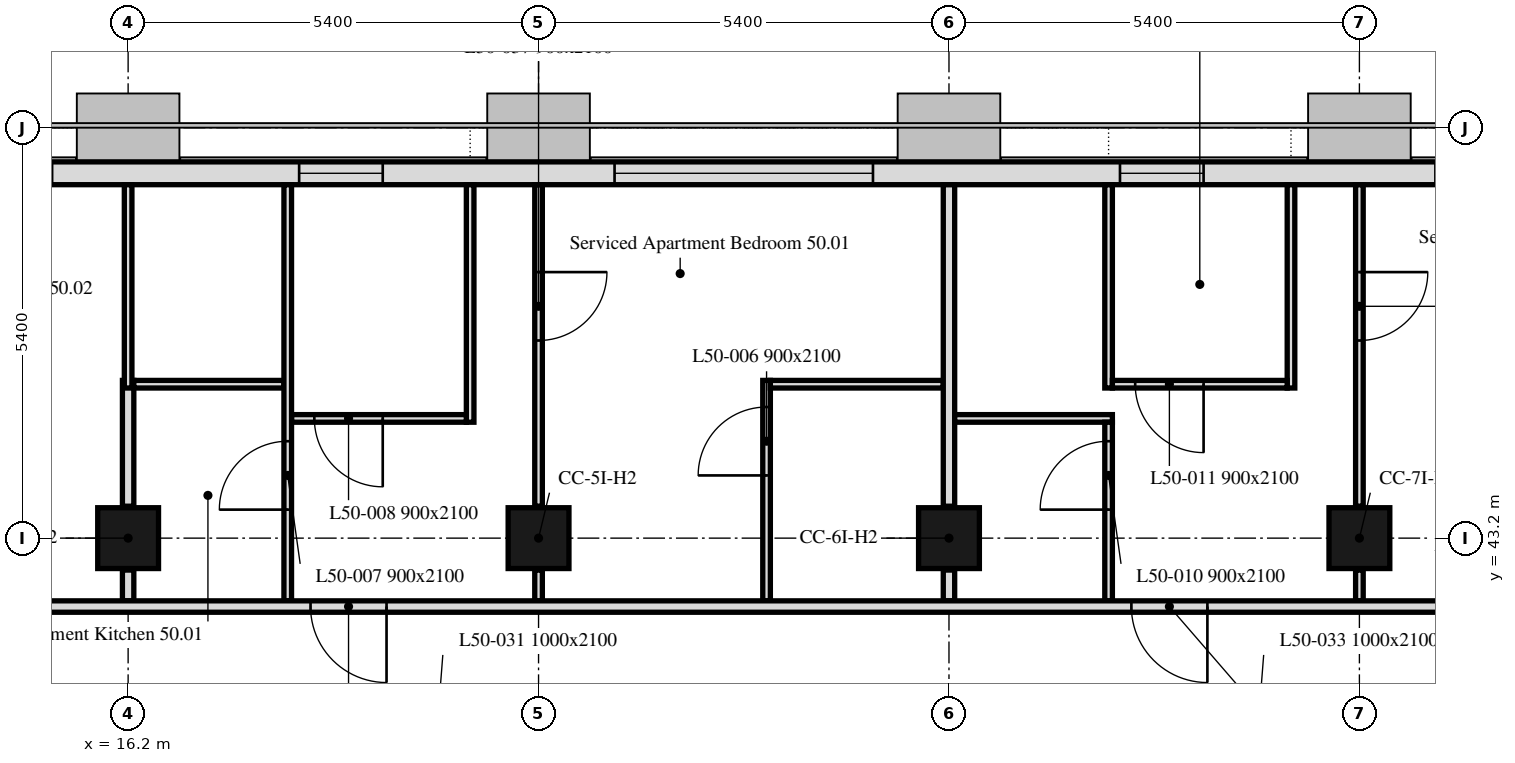
"""IFC4 building model, lengths in metres.
Left out: names, types, materials, properties, quantities, classifications, styles, units other than length and angle.
Written with IfcOpenShell. Run it as: python <this file> out.ifc"""

import sys

from ifc_helpers import new_model, si_unit, direction, frame, frame_2d, origin, origin_2d, place, context, subcontext, project, spatial, rectangle, extrude, element, fill, save


model = new_model("IFC4")
c1 = context("Model", 3, precision=1e-05, world=origin(), true_north=direction((0.0, 1.0)))
c2 = subcontext(c1, "Body", "Model", "MODEL_VIEW")
j1 = project(units=[si_unit("LENGTHUNIT", "METRE"), si_unit("PLANEANGLEUNIT", "RADIAN")], contexts=[c1])
p1 = place(None, origin())
s1 = spatial("IfcSite", under=j1, at=p1, CompositionType="ELEMENT")
p2 = place(p1, origin())
s2 = spatial("IfcBuilding", under=s1, at=p2, CompositionType="ELEMENT")
p3 = place(p2, frame((0.0, 0.0, 203.8)))
s3 = spatial("IfcBuildingStorey", under=s2, at=p3, CompositionType="ELEMENT", Elevation=203.8)
for number, where, z_axis, x_axis in (
    (1, (16.2, 43.2, 0.0), (0.0, 0.0, 1.0), (1.0, 0.0, 0.0)),
    (2, (21.6, 43.2, 0.0), (0.0, 0.0, 1.0), (1.0, 0.0, 0.0)),
    (3, (27.0, 43.2, 0.0), (0.0, 0.0, 1.0), (1.0, 0.0, 0.0)),
    (4, (32.4, 43.2, 0.0), (0.0, 0.0, 1.0), (1.0, 0.0, 0.0)),
):
    element("IfcColumn", number, at=place(p3, frame(where, z_axis=z_axis, x_axis=x_axis)), inside=s3, PredefinedType="COLUMN", context=c2, shape_type="SweptSolid", body=[
        extrude(rectangle(XDim=0.8, YDim=0.8, at=origin_2d()), origin(), (0.0, 0.0, 1.0), 3.0),
    ])
p4 = place(p3, frame((43.014, 48.0, 0.0), z_axis=(0.0, 0.0, 1.0), x_axis=(-1.0, 0.0, 0.0)))
e5 = element("IfcWall", 5, at=p4, inside=s3, PredefinedType="SOLIDWALL", context=c2, shape_type="SweptSolid", body=[
    extrude(rectangle(XDim=32.027, YDim=0.3, at=frame_2d((16.014, 0.0))), origin(), (0.0, 0.0, 1.0), 3.0),
])
p5 = place(p4, frame((2.764, 0.0, 0.9)))
e6 = element("IfcOpeningElement", 6, at=p5, cuts=e5, PredefinedType="OPENING", context=c2, shape_type="SweptSolid", body=[
    extrude(rectangle(XDim=1.1, YDim=1.7, at=frame_2d((0.55, 0.85))), frame((0.0, 0.16, 0.0), z_axis=(0.0, -1.0, 0.0), x_axis=(1.0, 0.0, 0.0)), (0.0, 0.0, 1.0), 0.32),
])
p6 = place(p4, frame((6.214, 0.0, 0.9)))
e7 = element("IfcOpeningElement", 7, at=p6, cuts=e5, PredefinedType="OPENING", context=c2, shape_type="SweptSolid", body=[
    extrude(rectangle(XDim=3.4, YDim=1.7, at=frame_2d((1.7, 0.85))), frame((0.0, 0.16, 0.0), z_axis=(0.0, -1.0, 0.0), x_axis=(1.0, 0.0, 0.0)), (0.0, 0.0, 1.0), 0.32),
])
p7 = place(p4, frame((12.664, 0.0, 0.9)))
e8 = element("IfcOpeningElement", 8, at=p7, cuts=e5, PredefinedType="OPENING", context=c2, shape_type="SweptSolid", body=[
    extrude(rectangle(XDim=1.1, YDim=1.7, at=frame_2d((0.55, 0.85))), frame((0.0, 0.16, 0.0), z_axis=(0.0, -1.0, 0.0), x_axis=(1.0, 0.0, 0.0)), (0.0, 0.0, 1.0), 0.32),
])
p8 = place(p4, frame((17.014, 0.0, 0.9)))
e9 = element("IfcOpeningElement", 9, at=p8, cuts=e5, PredefinedType="OPENING", context=c2, shape_type="SweptSolid", body=[
    extrude(rectangle(XDim=3.4, YDim=1.7, at=frame_2d((1.7, 0.85))), frame((0.0, 0.16, 0.0), z_axis=(0.0, -1.0, 0.0), x_axis=(1.0, 0.0, 0.0)), (0.0, 0.0, 1.0), 0.32),
])
p9 = place(p4, frame((23.464, 0.0, 0.9)))
e10 = element("IfcOpeningElement", 10, at=p9, cuts=e5, PredefinedType="OPENING", context=c2, shape_type="SweptSolid", body=[
    extrude(rectangle(XDim=1.1, YDim=1.7, at=frame_2d((0.55, 0.85))), frame((0.0, 0.16, 0.0), z_axis=(0.0, -1.0, 0.0), x_axis=(1.0, 0.0, 0.0)), (0.0, 0.0, 1.0), 0.32),
])
p10 = place(p4, frame((27.814, 0.0, 0.9)))
e11 = element("IfcOpeningElement", 11, at=p10, cuts=e5, PredefinedType="OPENING", context=c2, shape_type="SweptSolid", body=[
    extrude(rectangle(XDim=3.4, YDim=1.7, at=frame_2d((1.7, 0.85))), frame((0.0, 0.16, 0.0), z_axis=(0.0, -1.0, 0.0), x_axis=(1.0, 0.0, 0.0)), (0.0, 0.0, 1.0), 0.32),
])
p11 = place(p3, frame((16.2, 42.375, 0.0), z_axis=(0.0, 0.0, 1.0), x_axis=(0.0, 1.0, 0.0)))
e12 = element("IfcWall", 12, at=p11, inside=s3, PredefinedType="PARTITIONING", context=c2, shape_type="SweptSolid", body=[
    extrude(rectangle(XDim=0.405, YDim=0.15, at=frame_2d((0.203, 0.0))), origin(), (0.0, 0.0, 1.0), 2.4),
])
p12 = place(p3, frame((16.2, 43.62, 0.0), z_axis=(0.0, 0.0, 1.0), x_axis=(0.0, 1.0, 0.0)))
e13 = element("IfcWall", 13, at=p12, inside=s3, PredefinedType="PARTITIONING", context=c2, shape_type="SweptSolid", body=[
    extrude(rectangle(XDim=1.655, YDim=0.15, at=frame_2d((0.827, 0.0))), origin(), (0.0, 0.0, 1.0), 2.4),
])
p13 = place(p3, frame((16.2, 45.175, 0.0), z_axis=(0.0, 0.0, 1.0), x_axis=(0.0, 1.0, 0.0)))
e14 = element("IfcWall", 14, at=p13, inside=s3, PredefinedType="PARTITIONING", context=c2, shape_type="SweptSolid", body=[
    extrude(rectangle(XDim=2.674, YDim=0.1, at=frame_2d((1.337, 0.0))), origin(), (0.0, 0.0, 1.0), 2.4),
])
p14 = place(p3, frame((21.6, 47.849, 0.0), z_axis=(0.0, 0.0, 1.0), x_axis=(0.0, -1.0, 0.0)))
e15 = element("IfcWall", 15, at=p14, inside=s3, PredefinedType="PARTITIONING", context=c2, shape_type="SweptSolid", body=[
    extrude(rectangle(XDim=4.229, YDim=0.1, at=frame_2d((2.115, 0.0))), origin(), (0.0, 0.0, 1.0), 2.4),
])
p15 = place(p14, frame((1.149, 0.0, 0.0)))
e16 = element("IfcOpeningElement", 16, at=p15, cuts=e15, PredefinedType="OPENING", context=c2, shape_type="SweptSolid", body=[
    extrude(rectangle(XDim=0.9, YDim=2.1, at=frame_2d((0.45, 1.05))), frame((0.0, 0.05, 0.0), z_axis=(0.0, -1.0, 0.0), x_axis=(1.0, 0.0, 0.0)), (0.0, 0.0, 1.0), 0.1),
])
p16 = place(p3, frame((21.6, 42.78, 0.0), z_axis=(0.0, 0.0, 1.0), x_axis=(0.0, -1.0, 0.0)))
e17 = element("IfcWall", 17, at=p16, inside=s3, PredefinedType="PARTITIONING", context=c2, shape_type="SweptSolid", body=[
    extrude(rectangle(XDim=0.405, YDim=0.1, at=frame_2d((0.203, 0.0))), origin(), (0.0, 0.0, 1.0), 2.4),
])
p17 = place(p3, frame((24.6, 42.375, 0.0), z_axis=(0.0, 0.0, 1.0), x_axis=(0.0, 1.0, 0.0)))
e18 = element("IfcWall", 18, at=p17, inside=s3, PredefinedType="PARTITIONING", context=c2, shape_type="SweptSolid", body=[
    extrude(rectangle(XDim=2.9, YDim=0.1, at=frame_2d((1.45, 0.0))), origin(), (0.0, 0.0, 1.0), 3.0),
])
p18 = place(p17, frame((1.65, 0.0, 0.0)))
e19 = element("IfcOpeningElement", 19, at=p18, cuts=e18, PredefinedType="OPENING", context=c2, shape_type="SweptSolid", body=[
    extrude(rectangle(XDim=0.9, YDim=2.1, at=frame_2d((0.45, 1.05))), frame((0.0, 0.05, 0.0), z_axis=(0.0, -1.0, 0.0), x_axis=(1.0, 0.0, 0.0)), (0.0, 0.0, 1.0), 0.1),
])
p19 = place(p3, frame((24.65, 45.225, 0.0), z_axis=(0.0, 0.0, 1.0), x_axis=(1.0, 0.0, 0.0)))
e20 = element("IfcWall", 20, at=p19, inside=s3, PredefinedType="PARTITIONING", context=c2, shape_type="SweptSolid", body=[
    extrude(rectangle(XDim=2.275, YDim=0.1, at=frame_2d((1.138, 0.0))), origin(), (0.0, 0.0, 1.0), 3.0),
])
p20 = place(p3, frame((18.25, 45.225, 0.0), z_axis=(0.0, 0.0, 1.0), x_axis=(-1.0, 0.0, 0.0)))
e21 = element("IfcWall", 21, at=p20, inside=s3, PredefinedType="PARTITIONING", context=c2, shape_type="SweptSolid", body=[
    extrude(rectangle(XDim=1.975, YDim=0.1, at=frame_2d((0.988, 0.0))), origin(), (0.0, 0.0, 1.0), 3.0),
])
p21 = place(p3, frame((20.7, 47.849, 0.0), z_axis=(0.0, 0.0, 1.0), x_axis=(0.0, -1.0, 0.0)))
e22 = element("IfcWall", 22, at=p21, inside=s3, PredefinedType="PARTITIONING", context=c2, shape_type="SweptSolid", body=[
    extrude(rectangle(XDim=3.124, YDim=0.1, at=frame_2d((1.562, 0.0))), origin(), (0.0, 0.0, 1.0), 3.0),
])
p22 = place(p3, frame((20.65, 44.775, 0.0), z_axis=(0.0, 0.0, 1.0), x_axis=(-1.0, 0.0, 0.0)))
e23 = element("IfcWall", 23, at=p22, inside=s3, PredefinedType="PARTITIONING", context=c2, shape_type="SweptSolid", body=[
    extrude(rectangle(XDim=2.3, YDim=0.1, at=frame_2d((1.15, 0.0))), origin(), (0.0, 0.0, 1.0), 3.0),
])
p23 = place(p22, frame((1.1, 0.0, 0.0)))
e24 = element("IfcOpeningElement", 24, at=p23, cuts=e23, PredefinedType="OPENING", context=c2, shape_type="SweptSolid", body=[
    extrude(rectangle(XDim=0.9, YDim=2.1, at=frame_2d((0.45, 1.05))), frame((0.0, 0.05, 0.0), z_axis=(0.0, -1.0, 0.0), x_axis=(1.0, 0.0, 0.0)), (0.0, 0.0, 1.0), 0.1),
])
p24 = place(p3, frame((27.0, 42.375, 0.0), z_axis=(0.0, 0.0, 1.0), x_axis=(0.0, 1.0, 0.0)))
e25 = element("IfcWall", 25, at=p24, inside=s3, PredefinedType="PARTITIONING", context=c2, shape_type="SweptSolid", body=[
    extrude(rectangle(XDim=0.405, YDim=0.15, at=frame_2d((0.203, 0.0))), origin(), (0.0, 0.0, 1.0), 2.4),
])
p25 = place(p3, frame((27.0, 43.62, 0.0), z_axis=(0.0, 0.0, 1.0), x_axis=(0.0, 1.0, 0.0)))
e26 = element("IfcWall", 26, at=p25, inside=s3, PredefinedType="PARTITIONING", context=c2, shape_type="SweptSolid", body=[
    extrude(rectangle(XDim=4.229, YDim=0.15, at=frame_2d((2.115, 0.0))), origin(), (0.0, 0.0, 1.0), 2.4),
])
p26 = place(p3, frame((18.3, 42.375, 0.0), z_axis=(0.0, 0.0, 1.0), x_axis=(0.0, 1.0, 0.0)))
e27 = element("IfcWall", 27, at=p26, inside=s3, PredefinedType="PARTITIONING", context=c2, shape_type="SweptSolid", body=[
    extrude(rectangle(XDim=5.474, YDim=0.1, at=frame_2d((2.737, 0.0))), origin(), (0.0, 0.0, 1.0), 3.0),
])
p27 = place(p26, frame((1.2, 0.0, 0.0)))
e28 = element("IfcOpeningElement", 28, at=p27, cuts=e27, PredefinedType="OPENING", context=c2, shape_type="SweptSolid", body=[
    extrude(rectangle(XDim=0.9, YDim=2.1, at=frame_2d((0.45, 1.05))), frame((0.0, 0.05, 0.0), z_axis=(0.0, -1.0, 0.0), x_axis=(1.0, 0.0, 0.0)), (0.0, 0.0, 1.0), 0.1),
])
p28 = place(p3, frame((32.4, 47.849, 0.0), z_axis=(0.0, 0.0, 1.0), x_axis=(0.0, -1.0, 0.0)))
e29 = element("IfcWall", 29, at=p28, inside=s3, PredefinedType="PARTITIONING", context=c2, shape_type="SweptSolid", body=[
    extrude(rectangle(XDim=4.229, YDim=0.1, at=frame_2d((2.115, 0.0))), origin(), (0.0, 0.0, 1.0), 2.4),
])
p29 = place(p28, frame((1.149, 0.0, 0.0)))
e30 = element("IfcOpeningElement", 30, at=p29, cuts=e29, PredefinedType="OPENING", context=c2, shape_type="SweptSolid", body=[
    extrude(rectangle(XDim=0.9, YDim=2.1, at=frame_2d((0.45, 1.05))), frame((0.0, 0.05, 0.0), z_axis=(0.0, -1.0, 0.0), x_axis=(1.0, 0.0, 0.0)), (0.0, 0.0, 1.0), 0.1),
])
p30 = place(p3, frame((32.4, 42.78, 0.0), z_axis=(0.0, 0.0, 1.0), x_axis=(0.0, -1.0, 0.0)))
e31 = element("IfcWall", 31, at=p30, inside=s3, PredefinedType="PARTITIONING", context=c2, shape_type="SweptSolid", body=[
    extrude(rectangle(XDim=0.405, YDim=0.1, at=frame_2d((0.203, 0.0))), origin(), (0.0, 0.0, 1.0), 2.4),
])
p31 = place(p3, frame((29.15, 44.775, 0.0), z_axis=(0.0, 0.0, 1.0), x_axis=(-1.0, 0.0, 0.0)))
e32 = element("IfcWall", 32, at=p31, inside=s3, PredefinedType="PARTITIONING", context=c2, shape_type="SweptSolid", body=[
    extrude(rectangle(XDim=2.075, YDim=0.1, at=frame_2d((1.038, 0.0))), origin(), (0.0, 0.0, 1.0), 3.0),
])
p32 = place(p3, frame((29.1, 42.375, 0.0), z_axis=(0.0, 0.0, 1.0), x_axis=(0.0, 1.0, 0.0)))
e33 = element("IfcWall", 33, at=p32, inside=s3, PredefinedType="PARTITIONING", context=c2, shape_type="SweptSolid", body=[
    extrude(rectangle(XDim=2.35, YDim=0.1, at=frame_2d((1.175, 0.0))), origin(), (0.0, 0.0, 1.0), 3.0),
])
p33 = place(p32, frame((1.2, 0.0, 0.0)))
e34 = element("IfcOpeningElement", 34, at=p33, cuts=e33, PredefinedType="OPENING", context=c2, shape_type="SweptSolid", body=[
    extrude(rectangle(XDim=0.9, YDim=2.1, at=frame_2d((0.45, 1.05))), frame((0.0, 0.05, 0.0), z_axis=(0.0, -1.0, 0.0), x_axis=(1.0, 0.0, 0.0)), (0.0, 0.0, 1.0), 0.1),
])
for number, where, z_axis, x_axis in (
    (35, (29.1, 45.175, 0.0), (0.0, 0.0, 1.0), (0.0, 1.0, 0.0)),
    (36, (31.5, 47.849, 0.0), (0.0, 0.0, 1.0), (0.0, -1.0, 0.0)),
):
    element("IfcWall", number, at=place(p3, frame(where, z_axis=z_axis, x_axis=x_axis)), inside=s3, PredefinedType="PARTITIONING", context=c2, shape_type="SweptSolid", body=[
        extrude(rectangle(XDim=2.674, YDim=0.1, at=frame_2d((1.337, 0.0))), origin(), (0.0, 0.0, 1.0), 3.0),
    ])
p34 = place(p3, frame((31.45, 45.225, 0.0), z_axis=(0.0, 0.0, 1.0), x_axis=(-1.0, 0.0, 0.0)))
e37 = element("IfcWall", 37, at=p34, inside=s3, PredefinedType="PARTITIONING", context=c2, shape_type="SweptSolid", body=[
    extrude(rectangle(XDim=2.3, YDim=0.1, at=frame_2d((1.15, 0.0))), origin(), (0.0, 0.0, 1.0), 3.0),
])
p35 = place(p34, frame((1.1, 0.0, 0.0)))
e38 = element("IfcOpeningElement", 38, at=p35, cuts=e37, PredefinedType="OPENING", context=c2, shape_type="SweptSolid", body=[
    extrude(rectangle(XDim=0.9, YDim=2.1, at=frame_2d((0.45, 1.05))), frame((0.0, 0.05, 0.0), z_axis=(0.0, -1.0, 0.0), x_axis=(1.0, 0.0, 0.0)), (0.0, 0.0, 1.0), 0.1),
])
p36 = place(p3, frame((47.849, 42.3, 0.0), z_axis=(0.0, 0.0, 1.0), x_axis=(-1.0, 0.0, 0.0)))
e39 = element("IfcWall", 39, at=p36, inside=s3, PredefinedType="PARTITIONING", context=c2, shape_type="SweptSolid", body=[
    extrude(rectangle(XDim=41.698, YDim=0.15, at=frame_2d((20.849, 0.0))), origin(), (0.0, 0.0, 1.0), 2.4),
])
p37 = place(p36, frame((39.566, 0.0, 0.0)))
e40 = element("IfcOpeningElement", 40, at=p37, cuts=e39, PredefinedType="OPENING", context=c2, shape_type="SweptSolid", body=[
    extrude(rectangle(XDim=1.0, YDim=2.1, at=frame_2d((0.5, 1.05))), frame((0.0, 0.075, 0.0), z_axis=(0.0, -1.0, 0.0), x_axis=(1.0, 0.0, 0.0)), (0.0, 0.0, 1.0), 0.15),
])
p38 = place(p36, frame((3.099, 0.0, 0.0)))
e41 = element("IfcOpeningElement", 41, at=p38, cuts=e39, PredefinedType="OPENING", context=c2, shape_type="SweptSolid", body=[
    extrude(rectangle(XDim=1.0, YDim=2.1, at=frame_2d((0.5, 1.05))), frame((0.0, 0.075, 0.0), z_axis=(0.0, -1.0, 0.0), x_axis=(1.0, 0.0, 0.0)), (0.0, 0.0, 1.0), 0.15),
])
p39 = place(p36, frame((28.249, 0.0, 0.0)))
e42 = element("IfcOpeningElement", 42, at=p39, cuts=e39, PredefinedType="OPENING", context=c2, shape_type="SweptSolid", body=[
    extrude(rectangle(XDim=1.0, YDim=2.1, at=frame_2d((0.5, 1.05))), frame((0.0, 0.075, 0.0), z_axis=(0.0, -1.0, 0.0), x_axis=(1.0, 0.0, 0.0)), (0.0, 0.0, 1.0), 0.15),
])
p40 = place(p36, frame((17.449, 0.0, 0.0)))
e43 = element("IfcOpeningElement", 43, at=p40, cuts=e39, PredefinedType="OPENING", context=c2, shape_type="SweptSolid", body=[
    extrude(rectangle(XDim=1.0, YDim=2.1, at=frame_2d((0.5, 1.05))), frame((0.0, 0.075, 0.0), z_axis=(0.0, -1.0, 0.0), x_axis=(1.0, 0.0, 0.0)), (0.0, 0.0, 1.0), 0.15),
])
p41 = place(p7, origin())
e44 = element("IfcWindow", 44, at=p41, inside=s3, PartitioningType="SINGLE_PANEL", PredefinedType="WINDOW", context=c2, shape_type="SweptSolid", body=[
    extrude(rectangle(XDim=1.1, YDim=1.7, at=frame_2d((0.55, 0.85))), frame((0.0, 0.03, 0.0), z_axis=(0.0, -1.0, 0.0), x_axis=(1.0, 0.0, 0.0)), (0.0, 0.0, 1.0), 0.06),
])
fill(e8, e44)
p42 = place(p8, origin())
e45 = element("IfcWindow", 45, at=p42, inside=s3, PartitioningType="SINGLE_PANEL", PredefinedType="WINDOW", context=c2, shape_type="SweptSolid", body=[
    extrude(rectangle(XDim=3.4, YDim=1.7, at=frame_2d((1.7, 0.85))), frame((0.0, 0.03, 0.0), z_axis=(0.0, -1.0, 0.0), x_axis=(1.0, 0.0, 0.0)), (0.0, 0.0, 1.0), 0.06),
])
fill(e9, e45)
p43 = place(p9, origin())
e46 = element("IfcWindow", 46, at=p43, inside=s3, PartitioningType="SINGLE_PANEL", PredefinedType="WINDOW", context=c2, shape_type="SweptSolid", body=[
    extrude(rectangle(XDim=1.1, YDim=1.7, at=frame_2d((0.55, 0.85))), frame((0.0, 0.03, 0.0), z_axis=(0.0, -1.0, 0.0), x_axis=(1.0, 0.0, 0.0)), (0.0, 0.0, 1.0), 0.06),
])
fill(e10, e46)
p44 = place(p18, origin())
e47 = element("IfcDoor", 47, at=p44, inside=s3, OperationType="SINGLE_SWING_RIGHT", PredefinedType="DOOR", context=c2, shape_type="SweptSolid", body=[
    extrude(rectangle(XDim=0.9, YDim=2.1, at=frame_2d((0.45, 1.05))), frame((0.0, 0.025, 0.0), z_axis=(0.0, -1.0, 0.0), x_axis=(1.0, 0.0, 0.0)), (0.0, 0.0, 1.0), 0.05),
])
fill(e19, e47)
p45 = place(p27, origin())
e48 = element("IfcDoor", 48, at=p45, inside=s3, OperationType="SINGLE_SWING_LEFT", PredefinedType="DOOR", context=c2, shape_type="SweptSolid", body=[
    extrude(rectangle(XDim=0.9, YDim=2.1, at=frame_2d((0.45, 1.05))), frame((0.0, 0.025, 0.0), z_axis=(0.0, -1.0, 0.0), x_axis=(1.0, 0.0, 0.0)), (0.0, 0.0, 1.0), 0.05),
])
fill(e28, e48)
p46 = place(p23, origin())
e49 = element("IfcDoor", 49, at=p46, inside=s3, OperationType="SINGLE_SWING_RIGHT", PredefinedType="DOOR", context=c2, shape_type="SweptSolid", body=[
    extrude(rectangle(XDim=0.9, YDim=2.1, at=frame_2d((0.45, 1.05))), frame((0.0, 0.025, 0.0), z_axis=(0.0, -1.0, 0.0), x_axis=(1.0, 0.0, 0.0)), (0.0, 0.0, 1.0), 0.05),
])
fill(e24, e49)
p47 = place(p33, origin())
e50 = element("IfcDoor", 50, at=p47, inside=s3, OperationType="SINGLE_SWING_RIGHT", PredefinedType="DOOR", context=c2, shape_type="SweptSolid", body=[
    extrude(rectangle(XDim=0.9, YDim=2.1, at=frame_2d((0.45, 1.05))), frame((0.0, 0.025, 0.0), z_axis=(0.0, -1.0, 0.0), x_axis=(1.0, 0.0, 0.0)), (0.0, 0.0, 1.0), 0.05),
])
fill(e34, e50)
p48 = place(p35, origin())
e51 = element("IfcDoor", 51, at=p48, inside=s3, OperationType="SINGLE_SWING_LEFT", PredefinedType="DOOR", context=c2, shape_type="SweptSolid", body=[
    extrude(rectangle(XDim=0.9, YDim=2.1, at=frame_2d((0.45, 1.05))), frame((0.0, 0.025, 0.0), z_axis=(0.0, -1.0, 0.0), x_axis=(1.0, 0.0, 0.0)), (0.0, 0.0, 1.0), 0.05),
])
fill(e38, e51)
p49 = place(p15, origin())
e52 = element("IfcDoor", 52, at=p49, inside=s3, OperationType="SINGLE_SWING_LEFT", PredefinedType="DOOR", context=c2, shape_type="SweptSolid", body=[
    extrude(rectangle(XDim=0.9, YDim=2.1, at=frame_2d((0.45, 1.05))), frame((0.0, 0.025, 0.0), z_axis=(0.0, -1.0, 0.0), x_axis=(1.0, 0.0, 0.0)), (0.0, 0.0, 1.0), 0.05),
])
fill(e16, e52)
p50 = place(p29, origin())
e53 = element("IfcDoor", 53, at=p50, inside=s3, OperationType="SINGLE_SWING_RIGHT", PredefinedType="DOOR", context=c2, shape_type="SweptSolid", body=[
    extrude(rectangle(XDim=0.9, YDim=2.1, at=frame_2d((0.45, 1.05))), frame((0.0, 0.025, 0.0), z_axis=(0.0, -1.0, 0.0), x_axis=(1.0, 0.0, 0.0)), (0.0, 0.0, 1.0), 0.05),
])
fill(e30, e53)
p51 = place(p39, origin())
e54 = element("IfcDoor", 54, at=p51, inside=s3, OperationType="SINGLE_SWING_LEFT", PredefinedType="DOOR", context=c2, shape_type="SweptSolid", body=[
    extrude(rectangle(XDim=1.0, YDim=2.1, at=frame_2d((0.5, 1.05))), frame((0.0, 0.025, 0.0), z_axis=(0.0, -1.0, 0.0), x_axis=(1.0, 0.0, 0.0)), (0.0, 0.0, 1.0), 0.05),
])
fill(e42, e54)
p52 = place(p40, origin())
e55 = element("IfcDoor", 55, at=p52, inside=s3, OperationType="SINGLE_SWING_LEFT", PredefinedType="DOOR", context=c2, shape_type="SweptSolid", body=[
    extrude(rectangle(XDim=1.0, YDim=2.1, at=frame_2d((0.5, 1.05))), frame((0.0, 0.025, 0.0), z_axis=(0.0, -1.0, 0.0), x_axis=(1.0, 0.0, 0.0)), (0.0, 0.0, 1.0), 0.05),
])
fill(e43, e55)
save(model, sys.argv[1])
